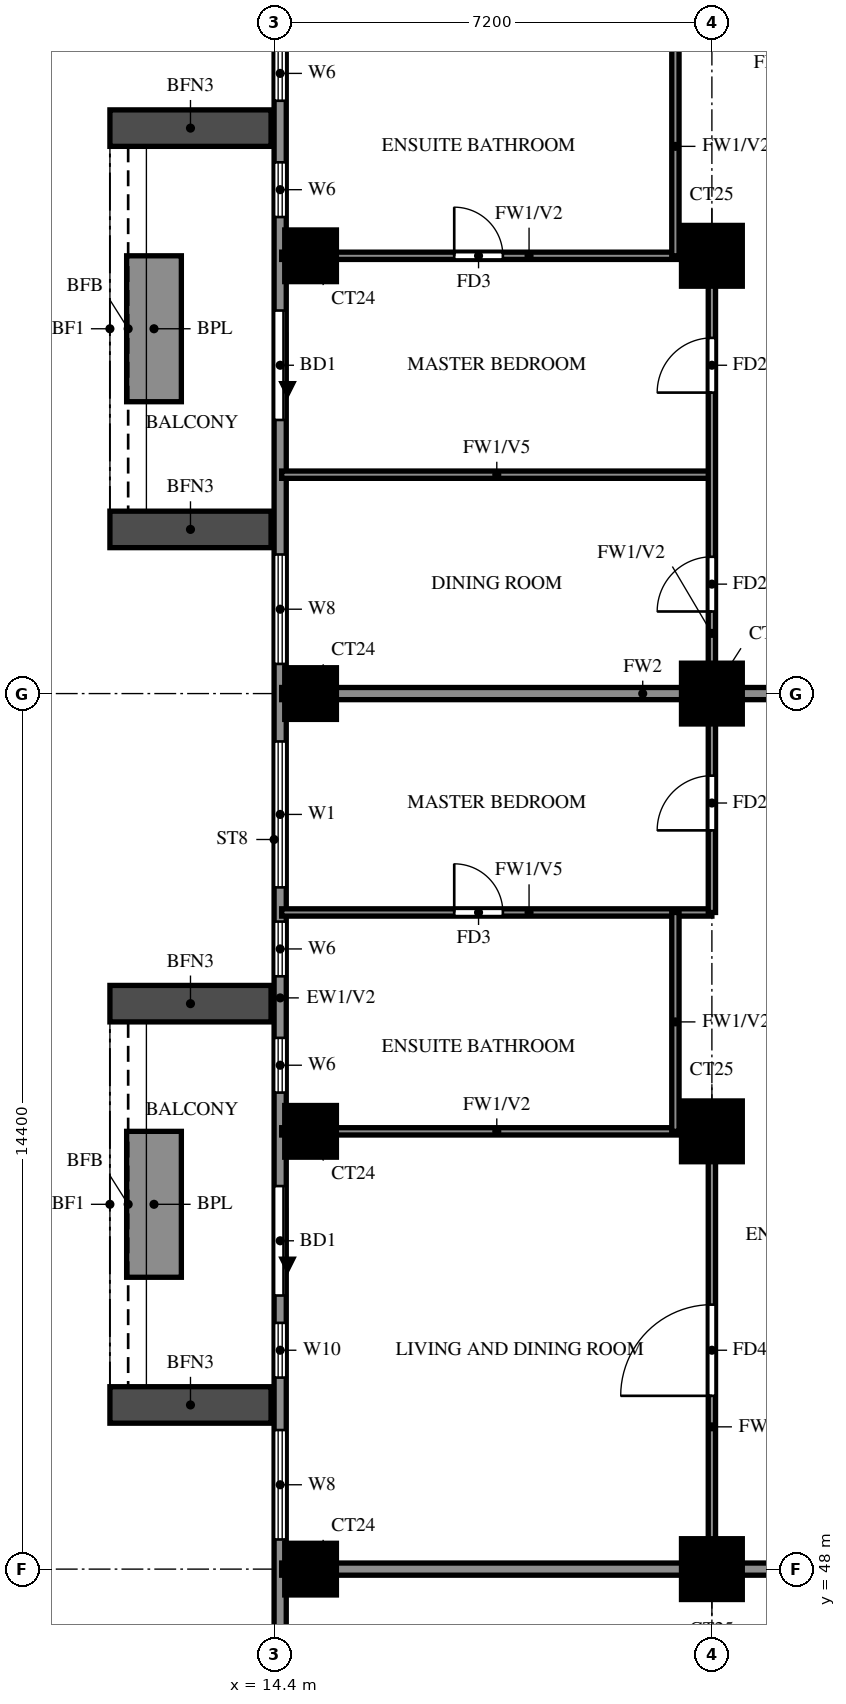
"""IFC4 building model, lengths in metres.
Left out: names, types, materials, properties, quantities, classifications, styles, units other than length and angle.
Written with IfcOpenShell. Run it as: python <this file> out.ifc"""

import sys

from ifc_helpers import new_model, si_unit, direction, frame, frame_2d, origin, origin_2d, place, context, subcontext, project, spatial, rectangle, extrude, source, transform, mapped, element, fill, save


model = new_model("IFC4")
c1 = context("Model", 3, precision=1e-05, world=origin(), true_north=direction((0.0, 1.0)))
c2 = subcontext(c1, "Body", "Model", "MODEL_VIEW")
j1 = project(units=[si_unit("LENGTHUNIT", "METRE"), si_unit("PLANEANGLEUNIT", "RADIAN")], contexts=[c1])
p1 = place(None, origin())
s1 = spatial("IfcSite", under=j1, at=p1, CompositionType="ELEMENT")
p2 = place(p1, origin())
s2 = spatial("IfcBuilding", under=s1, at=p2, CompositionType="ELEMENT")
p3 = place(p2, frame((0.0, 0.0, 150.0)))
s3 = spatial("IfcBuildingStorey", under=s2, at=p3, CompositionType="ELEMENT", Elevation=150.0)
m1 = source(origin(), c2, "Body", "SweptSolid", [
    extrude(rectangle(XDim=0.85, YDim=0.85, at=origin_2d()), origin(), (0.0, 0.0, 1.0), 3.2),
])
p4 = place(p3, frame((15.0, 48.0, 0.0), z_axis=(0.0, 0.0, 1.0), x_axis=(1.0, 0.0, 0.0)))
e1 = element("IfcColumn", 1, at=p4, inside=s3, PredefinedType="COLUMN", context=c2, shape_type="MappedRepresentation", body=[
    mapped(m1, transform((0.0, 0.0, 0.0))),
])
m2 = source(origin(), c2, "Body", "SweptSolid", [
    extrude(rectangle(XDim=1.0, YDim=1.0, at=origin_2d()), origin(), (0.0, 0.0, 1.0), 3.2),
])
p5 = place(p3, frame((21.6, 48.0, 0.0), z_axis=(0.0, 0.0, 1.0), x_axis=(1.0, 0.0, 0.0)))
e2 = element("IfcColumn", 2, at=p5, inside=s3, PredefinedType="COLUMN", context=c2, shape_type="MappedRepresentation", body=[
    mapped(m2, transform((0.0, 0.0, 0.0))),
])
p6 = place(p3, frame((15.0, 55.2, 0.0), z_axis=(0.0, 0.0, 1.0), x_axis=(1.0, 0.0, 0.0)))
e3 = element("IfcColumn", 3, at=p6, inside=s3, PredefinedType="COLUMN", context=c2, shape_type="MappedRepresentation", body=[
    mapped(m1, transform((0.0, 0.0, 0.0))),
])
p7 = place(p3, frame((21.6, 55.2, 0.0), z_axis=(0.0, 0.0, 1.0), x_axis=(1.0, 0.0, 0.0)))
e4 = element("IfcColumn", 4, at=p7, inside=s3, PredefinedType="COLUMN", context=c2, shape_type="MappedRepresentation", body=[
    mapped(m2, transform((0.0, 0.0, 0.0))),
])
p8 = place(p3, frame((15.0, 62.4, 0.0), z_axis=(0.0, 0.0, 1.0), x_axis=(1.0, 0.0, 0.0)))
e5 = element("IfcColumn", 5, at=p8, inside=s3, PredefinedType="COLUMN", context=c2, shape_type="MappedRepresentation", body=[
    mapped(m1, transform((0.0, 0.0, 0.0))),
])
p9 = place(p3, frame((21.6, 62.4, 0.0), z_axis=(0.0, 0.0, 1.0), x_axis=(1.0, 0.0, 0.0)))
e6 = element("IfcColumn", 6, at=p9, inside=s3, PredefinedType="COLUMN", context=c2, shape_type="MappedRepresentation", body=[
    mapped(m2, transform((0.0, 0.0, 0.0))),
])
p10 = place(p3, frame((15.0, 69.6, 0.0), z_axis=(0.0, 0.0, 1.0), x_axis=(1.0, 0.0, 0.0)))
e7 = element("IfcColumn", 7, at=p10, inside=s3, PredefinedType="COLUMN", context=c2, shape_type="MappedRepresentation", body=[
    mapped(m1, transform((0.0, 0.0, 0.0))),
])
p11 = place(p3, frame((21.6, 69.6, 0.0), z_axis=(0.0, 0.0, 1.0), x_axis=(1.0, 0.0, 0.0)))
e8 = element("IfcColumn", 8, at=p11, inside=s3, PredefinedType="COLUMN", context=c2, shape_type="MappedRepresentation", body=[
    mapped(m2, transform((0.0, 0.0, 0.0))),
])
p12 = place(p3, frame((14.5, 76.6, 0.0), z_axis=(0.0, 0.0, 1.0), x_axis=(0.0, -1.0, 0.0)))
e9 = element("IfcWall", 9, at=p12, inside=s3, PredefinedType="SOLIDWALL", context=c2, shape_type="SweptSolid", body=[
    extrude(rectangle(XDim=33.4, YDim=0.2, at=frame_2d((16.7, 0.0))), origin(), (0.0, 0.0, 1.0), 3.2),
])
p13 = place(p12, frame((7.9, 0.0, 0.0)))
e10 = element("IfcOpeningElement", 10, at=p13, cuts=e9, PredefinedType="OPENING", context=c2, shape_type="SweptSolid", body=[
    extrude(rectangle(XDim=1.8, YDim=2.4, at=frame_2d((0.9, 1.2))), frame((0.0, 0.11, 0.0), z_axis=(0.0, -1.0, 0.0), x_axis=(1.0, 0.0, 0.0)), (0.0, 0.0, 1.0), 0.22),
])
p14 = place(p12, frame((22.3, 0.0, 0.0)))
e11 = element("IfcOpeningElement", 11, at=p14, cuts=e9, PredefinedType="OPENING", context=c2, shape_type="SweptSolid", body=[
    extrude(rectangle(XDim=1.8, YDim=2.4, at=frame_2d((0.9, 1.2))), frame((0.0, 0.11, 0.0), z_axis=(0.0, -1.0, 0.0), x_axis=(1.0, 0.0, 0.0)), (0.0, 0.0, 1.0), 0.22),
])
p15 = place(p12, frame((29.887, 0.0, 0.6)))
e12 = element("IfcOpeningElement", 12, at=p15, cuts=e9, PredefinedType="OPENING", context=c2, shape_type="SweptSolid", body=[
    extrude(rectangle(XDim=2.4, YDim=2.4, at=frame_2d((1.2, 1.2))), frame((0.0, 0.11, 0.0), z_axis=(0.0, -1.0, 0.0), x_axis=(1.0, 0.0, 0.0)), (0.0, 0.0, 1.0), 0.22),
])
p16 = place(p12, frame((24.55, 0.0, 0.6)))
e13 = element("IfcOpeningElement", 13, at=p16, cuts=e9, PredefinedType="OPENING", context=c2, shape_type="SweptSolid", body=[
    extrude(rectangle(XDim=0.9, YDim=2.4, at=frame_2d((0.45, 1.2))), frame((0.0, 0.11, 0.0), z_axis=(0.0, -1.0, 0.0), x_axis=(1.0, 0.0, 0.0)), (0.0, 0.0, 1.0), 0.22),
])
p17 = place(p12, frame((26.312, 0.0, 0.6)))
e14 = element("IfcOpeningElement", 14, at=p17, cuts=e9, PredefinedType="OPENING", context=c2, shape_type="SweptSolid", body=[
    extrude(rectangle(XDim=1.8, YDim=2.4, at=frame_2d((0.9, 1.2))), frame((0.0, 0.11, 0.0), z_axis=(0.0, -1.0, 0.0), x_axis=(1.0, 0.0, 0.0)), (0.0, 0.0, 1.0), 0.22),
])
p18 = place(p12, frame((14.988, 0.0, 0.6)))
e15 = element("IfcOpeningElement", 15, at=p18, cuts=e9, PredefinedType="OPENING", context=c2, shape_type="SweptSolid", body=[
    extrude(rectangle(XDim=2.4, YDim=2.4, at=frame_2d((1.2, 1.2))), frame((0.0, 0.11, 0.0), z_axis=(0.0, -1.0, 0.0), x_axis=(1.0, 0.0, 0.0)), (0.0, 0.0, 1.0), 0.22),
])
p19 = place(p12, frame((17.95, 0.0, 1.5)))
e16 = element("IfcOpeningElement", 16, at=p19, cuts=e9, PredefinedType="OPENING", context=c2, shape_type="SweptSolid", body=[
    extrude(rectangle(XDim=0.9, YDim=0.9, at=frame_2d((0.45, 0.45))), frame((0.0, 0.11, 0.0), z_axis=(0.0, -1.0, 0.0), x_axis=(1.0, 0.0, 0.0)), (0.0, 0.0, 1.0), 0.22),
])
p20 = place(p12, frame((19.863, 0.0, 1.5)))
e17 = element("IfcOpeningElement", 17, at=p20, cuts=e9, PredefinedType="OPENING", context=c2, shape_type="SweptSolid", body=[
    extrude(rectangle(XDim=0.9, YDim=0.9, at=frame_2d((0.45, 0.45))), frame((0.0, 0.11, 0.0), z_axis=(0.0, -1.0, 0.0), x_axis=(1.0, 0.0, 0.0)), (0.0, 0.0, 1.0), 0.22),
])
p21 = place(p12, frame((11.913, 0.0, 0.6)))
e18 = element("IfcOpeningElement", 18, at=p21, cuts=e9, PredefinedType="OPENING", context=c2, shape_type="SweptSolid", body=[
    extrude(rectangle(XDim=1.8, YDim=2.4, at=frame_2d((0.9, 1.2))), frame((0.0, 0.11, 0.0), z_axis=(0.0, -1.0, 0.0), x_axis=(1.0, 0.0, 0.0)), (0.0, 0.0, 1.0), 0.22),
])
p22 = place(p12, frame((3.55, 0.0, 1.5)))
e19 = element("IfcOpeningElement", 19, at=p22, cuts=e9, PredefinedType="OPENING", context=c2, shape_type="SweptSolid", body=[
    extrude(rectangle(XDim=0.9, YDim=0.9, at=frame_2d((0.45, 0.45))), frame((0.0, 0.11, 0.0), z_axis=(0.0, -1.0, 0.0), x_axis=(1.0, 0.0, 0.0)), (0.0, 0.0, 1.0), 0.22),
])
p23 = place(p12, frame((5.462, 0.0, 1.5)))
e20 = element("IfcOpeningElement", 20, at=p23, cuts=e9, PredefinedType="OPENING", context=c2, shape_type="SweptSolid", body=[
    extrude(rectangle(XDim=0.9, YDim=0.9, at=frame_2d((0.45, 0.45))), frame((0.0, 0.11, 0.0), z_axis=(0.0, -1.0, 0.0), x_axis=(1.0, 0.0, 0.0)), (0.0, 0.0, 1.0), 0.22),
])
p24 = place(p12, frame((0.6, 0.0, 0.6)))
e21 = element("IfcOpeningElement", 21, at=p24, cuts=e9, PredefinedType="OPENING", context=c2, shape_type="SweptSolid", body=[
    extrude(rectangle(XDim=2.4, YDim=2.4, at=frame_2d((1.2, 1.2))), frame((0.0, 0.11, 0.0), z_axis=(0.0, -1.0, 0.0), x_axis=(1.0, 0.0, 0.0)), (0.0, 0.0, 1.0), 0.22),
])
for number, where, z_axis, x_axis in (
    (22, (14.35, 71.7, 0.0), (0.0, 0.0, 1.0), (-1.0, 0.0, 0.0)),
    (23, (14.35, 65.1, 0.0), (0.0, 0.0, 1.0), (-1.0, 0.0, 0.0)),
):
    element("IfcWall", number, at=place(p3, frame(where, z_axis=z_axis, x_axis=x_axis)), inside=s3, PredefinedType="SOLIDWALL", context=c2, shape_type="SweptSolid", body=[
        extrude(rectangle(XDim=2.65, YDim=0.6, at=frame_2d((1.325, 0.0))), origin(), (0.0, 0.0, 1.0), 2.85),
    ])
p25 = place(p3, frame((12.425, 69.6, 0.0), z_axis=(0.0, 0.0, 1.0), x_axis=(0.0, -1.0, 0.0)))
e24 = element("IfcWall", 24, at=p25, inside=s3, PredefinedType="SOLIDWALL", context=c2, shape_type="SweptSolid", body=[
    extrude(rectangle(XDim=2.4, YDim=0.9, at=frame_2d((1.2, 0.0))), origin(), (0.0, 0.0, 1.0), 0.9),
])
for number, where, z_axis, x_axis in (
    (25, (14.35, 57.3, 0.0), (0.0, 0.0, 1.0), (-1.0, 0.0, 0.0)),
    (26, (14.35, 50.7, 0.0), (0.0, 0.0, 1.0), (-1.0, 0.0, 0.0)),
):
    element("IfcWall", number, at=place(p3, frame(where, z_axis=z_axis, x_axis=x_axis)), inside=s3, PredefinedType="SOLIDWALL", context=c2, shape_type="SweptSolid", body=[
        extrude(rectangle(XDim=2.65, YDim=0.6, at=frame_2d((1.325, 0.0))), origin(), (0.0, 0.0, 1.0), 2.85),
    ])
p26 = place(p3, frame((12.425, 55.2, 0.0), z_axis=(0.0, 0.0, 1.0), x_axis=(0.0, -1.0, 0.0)))
e27 = element("IfcWall", 27, at=p26, inside=s3, PredefinedType="SOLIDWALL", context=c2, shape_type="SweptSolid", body=[
    extrude(rectangle(XDim=2.4, YDim=0.9, at=frame_2d((1.2, 0.0))), origin(), (0.0, 0.0, 1.0), 0.9),
])
p27 = place(p3, frame((14.525, 48.0, 0.0), z_axis=(0.0, 0.0, 1.0), x_axis=(1.0, 0.0, 0.0)))
e28 = element("IfcWall", 28, at=p27, inside=s3, PredefinedType="SOLIDWALL", context=c2, shape_type="SweptSolid", body=[
    extrude(rectangle(XDim=19.075, YDim=0.2, at=frame_2d((9.538, 0.0))), origin(), (0.0, 0.0, 1.0), 3.2),
])
p28 = place(p3, frame((14.525, 62.4, 0.0), z_axis=(0.0, 0.0, 1.0), x_axis=(1.0, 0.0, 0.0)))
e29 = element("IfcWall", 29, at=p28, inside=s3, PredefinedType="SOLIDWALL", context=c2, shape_type="SweptSolid", body=[
    extrude(rectangle(XDim=11.875, YDim=0.2, at=frame_2d((5.938, 0.0))), origin(), (0.0, 0.0, 1.0), 3.2),
])
p29 = place(p3, frame((14.525, 55.2, 0.0), z_axis=(0.0, 0.0, 1.0), x_axis=(1.0, 0.0, 0.0)))
e30 = element("IfcWall", 30, at=p29, inside=s3, PredefinedType="PARTITIONING", context=c2, shape_type="SweptSolid", body=[
    extrude(rectangle(XDim=7.075, YDim=0.12, at=frame_2d((3.538, 0.0))), origin(), (0.0, 0.0, 1.0), 3.2),
])
p30 = place(p3, frame((14.525, 58.8, 0.0), z_axis=(0.0, 0.0, 1.0), x_axis=(1.0, 0.0, 0.0)))
e31 = element("IfcWall", 31, at=p30, inside=s3, PredefinedType="PARTITIONING", context=c2, shape_type="SweptSolid", body=[
    extrude(rectangle(XDim=7.075, YDim=0.12, at=frame_2d((3.538, 0.0))), origin(), (0.0, 0.0, 1.0), 2.3),
])
p31 = place(p30, frame((2.837, 0.0, 0.0)))
e32 = element("IfcOpeningElement", 32, at=p31, cuts=e31, PredefinedType="OPENING", context=c2, shape_type="SweptSolid", body=[
    extrude(rectangle(XDim=0.8, YDim=2.1, at=frame_2d((0.4, 1.05))), frame((0.0, 0.07, 0.0), z_axis=(0.0, -1.0, 0.0), x_axis=(1.0, 0.0, 0.0)), (0.0, 0.0, 1.0), 0.14),
])
p32 = place(p3, frame((14.525, 66.0, 0.0), z_axis=(0.0, 0.0, 1.0), x_axis=(1.0, 0.0, 0.0)))
e33 = element("IfcWall", 33, at=p32, inside=s3, PredefinedType="PARTITIONING", context=c2, shape_type="SweptSolid", body=[
    extrude(rectangle(XDim=7.075, YDim=0.12, at=frame_2d((3.538, 0.0))), origin(), (0.0, 0.0, 1.0), 2.3),
])
p33 = place(p3, frame((14.525, 69.6, 0.0), z_axis=(0.0, 0.0, 1.0), x_axis=(1.0, 0.0, 0.0)))
e34 = element("IfcWall", 34, at=p33, inside=s3, PredefinedType="PARTITIONING", context=c2, shape_type="SweptSolid", body=[
    extrude(rectangle(XDim=7.075, YDim=0.12, at=frame_2d((3.538, 0.0))), origin(), (0.0, 0.0, 1.0), 3.2),
])
p34 = place(p33, frame((2.837, 0.0, 0.0)))
e35 = element("IfcOpeningElement", 35, at=p34, cuts=e34, PredefinedType="OPENING", context=c2, shape_type="SweptSolid", body=[
    extrude(rectangle(XDim=0.8, YDim=2.1, at=frame_2d((0.4, 1.05))), frame((0.0, 0.07, 0.0), z_axis=(0.0, -1.0, 0.0), x_axis=(1.0, 0.0, 0.0)), (0.0, 0.0, 1.0), 0.14),
])
p35 = place(p3, frame((21.0, 55.2, 0.0), z_axis=(0.0, 0.0, 1.0), x_axis=(0.0, 1.0, 0.0)))
e36 = element("IfcWall", 36, at=p35, inside=s3, PredefinedType="PARTITIONING", context=c2, shape_type="SweptSolid", body=[
    extrude(rectangle(XDim=3.6, YDim=0.12, at=frame_2d((1.8, 0.0))), origin(), (0.0, 0.0, 1.0), 3.2),
])
p36 = place(p3, frame((21.0, 69.6, 0.0), z_axis=(0.0, 0.0, 1.0), x_axis=(0.0, 1.0, 0.0)))
e37 = element("IfcWall", 37, at=p36, inside=s3, PredefinedType="PARTITIONING", context=c2, shape_type="SweptSolid", body=[
    extrude(rectangle(XDim=3.6, YDim=0.12, at=frame_2d((1.8, 0.0))), origin(), (0.0, 0.0, 1.0), 3.2),
])
p37 = place(p3, frame((21.6, 48.0, 0.0), z_axis=(0.0, 0.0, 1.0), x_axis=(0.0, 1.0, 0.0)))
e38 = element("IfcWall", 38, at=p37, inside=s3, PredefinedType="PARTITIONING", context=c2, shape_type="SweptSolid", body=[
    extrude(rectangle(XDim=7.2, YDim=0.12, at=frame_2d((3.6, 0.0))), origin(), (0.0, 0.0, 1.0), 3.2),
])
p38 = place(p37, frame((2.85, 0.0, 0.0)))
e39 = element("IfcOpeningElement", 39, at=p38, cuts=e38, PredefinedType="OPENING", context=c2, shape_type="SweptSolid", body=[
    extrude(rectangle(XDim=1.5, YDim=2.1, at=frame_2d((0.75, 1.05))), frame((0.0, 0.07, 0.0), z_axis=(0.0, -1.0, 0.0), x_axis=(1.0, 0.0, 0.0)), (0.0, 0.0, 1.0), 0.14),
])
p39 = place(p3, frame((21.6, 58.8, 0.0), z_axis=(0.0, 0.0, 1.0), x_axis=(0.0, 1.0, 0.0)))
e40 = element("IfcWall", 40, at=p39, inside=s3, PredefinedType="PARTITIONING", context=c2, shape_type="SweptSolid", body=[
    extrude(rectangle(XDim=10.8, YDim=0.12, at=frame_2d((5.4, 0.0))), origin(), (0.0, 0.0, 1.0), 3.2),
])
p40 = place(p39, frame((1.35, 0.0, 0.0)))
e41 = element("IfcOpeningElement", 41, at=p40, cuts=e40, PredefinedType="OPENING", context=c2, shape_type="SweptSolid", body=[
    extrude(rectangle(XDim=0.9, YDim=2.1, at=frame_2d((0.45, 1.05))), frame((0.0, 0.07, 0.0), z_axis=(0.0, -1.0, 0.0), x_axis=(1.0, 0.0, 0.0)), (0.0, 0.0, 1.0), 0.14),
])
p41 = place(p39, frame((4.95, 0.0, 0.0)))
e42 = element("IfcOpeningElement", 42, at=p41, cuts=e40, PredefinedType="OPENING", context=c2, shape_type="SweptSolid", body=[
    extrude(rectangle(XDim=0.9, YDim=2.1, at=frame_2d((0.45, 1.05))), frame((0.0, 0.07, 0.0), z_axis=(0.0, -1.0, 0.0), x_axis=(1.0, 0.0, 0.0)), (0.0, 0.0, 1.0), 0.14),
])
p42 = place(p39, frame((8.55, 0.0, 0.0)))
e43 = element("IfcOpeningElement", 43, at=p42, cuts=e40, PredefinedType="OPENING", context=c2, shape_type="SweptSolid", body=[
    extrude(rectangle(XDim=0.9, YDim=2.1, at=frame_2d((0.45, 1.05))), frame((0.0, 0.07, 0.0), z_axis=(0.0, -1.0, 0.0), x_axis=(1.0, 0.0, 0.0)), (0.0, 0.0, 1.0), 0.14),
])
p43 = place(p13, origin())
e44 = element("IfcDoor", 44, at=p43, inside=s3, OperationType="DOUBLE_DOOR_SLIDING", PredefinedType="DOOR", context=c2, shape_type="SweptSolid", body=[
    extrude(rectangle(XDim=1.8, YDim=2.4, at=frame_2d((0.9, 1.2))), frame((0.0, 0.025, 0.0), z_axis=(0.0, -1.0, 0.0), x_axis=(1.0, 0.0, 0.0)), (0.0, 0.0, 1.0), 0.05),
])
fill(e10, e44)
p44 = place(p14, origin())
e45 = element("IfcDoor", 45, at=p44, inside=s3, OperationType="DOUBLE_DOOR_SLIDING", PredefinedType="DOOR", context=c2, shape_type="SweptSolid", body=[
    extrude(rectangle(XDim=1.8, YDim=2.4, at=frame_2d((0.9, 1.2))), frame((0.0, 0.025, 0.0), z_axis=(0.0, -1.0, 0.0), x_axis=(1.0, 0.0, 0.0)), (0.0, 0.0, 1.0), 0.05),
])
fill(e11, e45)
p45 = place(p16, origin())
e46 = element("IfcWindow", 46, at=p45, inside=s3, PartitioningType="SINGLE_PANEL", PredefinedType="WINDOW", context=c2, shape_type="SweptSolid", body=[
    extrude(rectangle(XDim=0.9, YDim=2.4, at=frame_2d((0.45, 1.2))), frame((0.0, 0.03, 0.0), z_axis=(0.0, -1.0, 0.0), x_axis=(1.0, 0.0, 0.0)), (0.0, 0.0, 1.0), 0.06),
])
fill(e13, e46)
p46 = place(p17, origin())
e47 = element("IfcWindow", 47, at=p46, inside=s3, PartitioningType="DOUBLE_PANEL_VERTICAL", PredefinedType="WINDOW", context=c2, shape_type="SweptSolid", body=[
    extrude(rectangle(XDim=1.8, YDim=2.4, at=frame_2d((0.9, 1.2))), frame((0.0, 0.03, 0.0), z_axis=(0.0, -1.0, 0.0), x_axis=(1.0, 0.0, 0.0)), (0.0, 0.0, 1.0), 0.06),
])
fill(e14, e47)
p47 = place(p18, origin())
e48 = element("IfcWindow", 48, at=p47, inside=s3, PartitioningType="DOUBLE_PANEL_VERTICAL", PredefinedType="WINDOW", context=c2, shape_type="SweptSolid", body=[
    extrude(rectangle(XDim=2.4, YDim=2.4, at=frame_2d((1.2, 1.2))), frame((0.0, 0.03, 0.0), z_axis=(0.0, -1.0, 0.0), x_axis=(1.0, 0.0, 0.0)), (0.0, 0.0, 1.0), 0.06),
])
fill(e15, e48)
p48 = place(p19, origin())
e49 = element("IfcWindow", 49, at=p48, inside=s3, PartitioningType="SINGLE_PANEL", PredefinedType="WINDOW", context=c2, shape_type="SweptSolid", body=[
    extrude(rectangle(XDim=0.9, YDim=0.9, at=frame_2d((0.45, 0.45))), frame((0.0, 0.03, 0.0), z_axis=(0.0, -1.0, 0.0), x_axis=(1.0, 0.0, 0.0)), (0.0, 0.0, 1.0), 0.06),
])
fill(e16, e49)
p49 = place(p20, origin())
e50 = element("IfcWindow", 50, at=p49, inside=s3, PartitioningType="SINGLE_PANEL", PredefinedType="WINDOW", context=c2, shape_type="SweptSolid", body=[
    extrude(rectangle(XDim=0.9, YDim=0.9, at=frame_2d((0.45, 0.45))), frame((0.0, 0.03, 0.0), z_axis=(0.0, -1.0, 0.0), x_axis=(1.0, 0.0, 0.0)), (0.0, 0.0, 1.0), 0.06),
])
fill(e17, e50)
p50 = place(p21, origin())
e51 = element("IfcWindow", 51, at=p50, inside=s3, PartitioningType="DOUBLE_PANEL_VERTICAL", PredefinedType="WINDOW", context=c2, shape_type="SweptSolid", body=[
    extrude(rectangle(XDim=1.8, YDim=2.4, at=frame_2d((0.9, 1.2))), frame((0.0, 0.03, 0.0), z_axis=(0.0, -1.0, 0.0), x_axis=(1.0, 0.0, 0.0)), (0.0, 0.0, 1.0), 0.06),
])
fill(e18, e51)
p51 = place(p22, origin())
e52 = element("IfcWindow", 52, at=p51, inside=s3, PartitioningType="SINGLE_PANEL", PredefinedType="WINDOW", context=c2, shape_type="SweptSolid", body=[
    extrude(rectangle(XDim=0.9, YDim=0.9, at=frame_2d((0.45, 0.45))), frame((0.0, 0.03, 0.0), z_axis=(0.0, -1.0, 0.0), x_axis=(1.0, 0.0, 0.0)), (0.0, 0.0, 1.0), 0.06),
])
fill(e19, e52)
p52 = place(p23, origin())
e53 = element("IfcWindow", 53, at=p52, inside=s3, PartitioningType="SINGLE_PANEL", PredefinedType="WINDOW", context=c2, shape_type="SweptSolid", body=[
    extrude(rectangle(XDim=0.9, YDim=0.9, at=frame_2d((0.45, 0.45))), frame((0.0, 0.03, 0.0), z_axis=(0.0, -1.0, 0.0), x_axis=(1.0, 0.0, 0.0)), (0.0, 0.0, 1.0), 0.06),
])
fill(e20, e53)
p53 = place(p38, origin())
e54 = element("IfcDoor", 54, at=p53, inside=s3, OperationType="SINGLE_SWING_LEFT", PredefinedType="DOOR", context=c2, shape_type="SweptSolid", body=[
    extrude(rectangle(XDim=1.5, YDim=2.1, at=frame_2d((0.75, 1.05))), frame((0.0, 0.025, 0.0), z_axis=(0.0, -1.0, 0.0), x_axis=(1.0, 0.0, 0.0)), (0.0, 0.0, 1.0), 0.05),
])
fill(e39, e54)
p54 = place(p40, origin())
e55 = element("IfcDoor", 55, at=p54, inside=s3, OperationType="SINGLE_SWING_LEFT", PredefinedType="DOOR", context=c2, shape_type="SweptSolid", body=[
    extrude(rectangle(XDim=0.9, YDim=2.1, at=frame_2d((0.45, 1.05))), frame((0.0, 0.025, 0.0), z_axis=(0.0, -1.0, 0.0), x_axis=(1.0, 0.0, 0.0)), (0.0, 0.0, 1.0), 0.05),
])
fill(e41, e55)
p55 = place(p31, origin())
e56 = element("IfcDoor", 56, at=p55, inside=s3, OperationType="SINGLE_SWING_RIGHT", PredefinedType="DOOR", context=c2, shape_type="SweptSolid", body=[
    extrude(rectangle(XDim=0.8, YDim=2.1, at=frame_2d((0.4, 1.05))), frame((0.0, 0.025, 0.0), z_axis=(0.0, -1.0, 0.0), x_axis=(1.0, 0.0, 0.0)), (0.0, 0.0, 1.0), 0.05),
])
fill(e32, e56)
p56 = place(p41, origin())
e57 = element("IfcDoor", 57, at=p56, inside=s3, OperationType="SINGLE_SWING_LEFT", PredefinedType="DOOR", context=c2, shape_type="SweptSolid", body=[
    extrude(rectangle(XDim=0.9, YDim=2.1, at=frame_2d((0.45, 1.05))), frame((0.0, 0.025, 0.0), z_axis=(0.0, -1.0, 0.0), x_axis=(1.0, 0.0, 0.0)), (0.0, 0.0, 1.0), 0.05),
])
fill(e42, e57)
p57 = place(p42, origin())
e58 = element("IfcDoor", 58, at=p57, inside=s3, OperationType="SINGLE_SWING_RIGHT", PredefinedType="DOOR", context=c2, shape_type="SweptSolid", body=[
    extrude(rectangle(XDim=0.9, YDim=2.1, at=frame_2d((0.45, 1.05))), frame((0.0, 0.025, 0.0), z_axis=(0.0, -1.0, 0.0), x_axis=(1.0, 0.0, 0.0)), (0.0, 0.0, 1.0), 0.05),
])
fill(e43, e58)
p58 = place(p34, origin())
e59 = element("IfcDoor", 59, at=p58, inside=s3, OperationType="SINGLE_SWING_LEFT", PredefinedType="DOOR", context=c2, shape_type="SweptSolid", body=[
    extrude(rectangle(XDim=0.8, YDim=2.1, at=frame_2d((0.4, 1.05))), frame((0.0, 0.025, 0.0), z_axis=(0.0, -1.0, 0.0), x_axis=(1.0, 0.0, 0.0)), (0.0, 0.0, 1.0), 0.05),
])
fill(e35, e59)
save(model, sys.argv[1])
